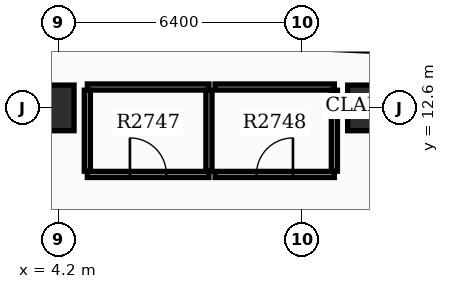
"""IFC4 building model, lengths in metres.
Left out: names, types, materials, properties, quantities, classifications, styles, units other than length and angle.
Written with IfcOpenShell. Run it as: python <this file> out.ifc"""

import sys

from ifc_helpers import new_model, si_unit, direction, frame, frame_2d, origin, origin_2d, place, context, subcontext, project, spatial, rectangle, extrude, element, fill, save


model = new_model("IFC4")
c1 = context("Model", 3, precision=1e-05, world=origin(), true_north=direction((0.0, 1.0)))
c2 = subcontext(c1, "Body", "Model", "MODEL_VIEW")
j1 = project(units=[si_unit("LENGTHUNIT", "METRE"), si_unit("PLANEANGLEUNIT", "RADIAN")], contexts=[c1])
p1 = place(None, origin())
s1 = spatial("IfcSite", under=j1, at=p1, CompositionType="ELEMENT")
p2 = place(p1, origin())
s2 = spatial("IfcBuilding", under=s1, at=p2, CompositionType="ELEMENT")
p3 = place(p2, frame((0.0, 0.0, 172.2)))
s3 = spatial("IfcBuildingStorey", under=s2, at=p3, CompositionType="ELEMENT", Elevation=172.2)
for number, where, z_axis, x_axis in (
    (1, (12.4, 12.6, 0.0), (0.0, 0.0, 1.0), (1.0, 0.0, 0.0)),
    (2, (4.0, 12.6, 0.0), (0.0, 0.0, 1.0), (1.0, 0.0, 0.0)),
):
    element("IfcColumn", number, at=place(p3, frame(where, z_axis=z_axis, x_axis=x_axis)), inside=s3, PredefinedType="COLUMN", context=c2, shape_type="SweptSolid", body=[
        extrude(rectangle(XDim=1.2, YDim=1.2, at=origin_2d()), origin(), (0.0, 0.0, 1.0), 3.9),
    ])
p4 = place(p3, frame((13.843, 14.164, 0.0), z_axis=(0.0, 0.0, 1.0), x_axis=(-0.998889082162, 0.047123258997, 0.0)))
e3 = element("IfcWall", 3, at=p4, inside=s3, PredefinedType="STANDARD", context=c2, shape_type="SweptSolid", body=[
    extrude(rectangle(XDim=6.3, YDim=0.28, at=frame_2d((3.15, 0.0))), origin(), (0.0, 0.0, 1.0), 2.97),
])
p5 = place(p3, frame((4.95, 10.85, 0.0), z_axis=(0.0, 0.0, 1.0), x_axis=(1.0, 0.0, 0.0)))
e4 = element("IfcWall", 4, at=p5, inside=s3, PredefinedType="PARTITIONING", context=c2, shape_type="SweptSolid", body=[
    extrude(rectangle(XDim=3.2, YDim=0.16, at=frame_2d((1.6, 0.0))), origin(), (0.0, 0.0, 1.0), 2.96),
])
p6 = place(p5, frame((1.12, 0.0, 0.0)))
e5 = element("IfcOpeningElement", 5, at=p6, cuts=e4, PredefinedType="OPENING", context=c2, shape_type="SweptSolid", body=[
    extrude(rectangle(XDim=0.96, YDim=2.15, at=frame_2d((0.48, 1.075))), frame((0.0, 0.09, 0.0), z_axis=(0.0, -1.0, 0.0), x_axis=(1.0, 0.0, 0.0)), (0.0, 0.0, 1.0), 0.18),
])
p7 = place(p3, frame((4.95, 13.15, 0.0), z_axis=(0.0, 0.0, 1.0), x_axis=(1.0, 0.0, 0.0)))
e6 = element("IfcWall", 6, at=p7, inside=s3, PredefinedType="PARTITIONING", context=c2, shape_type="SweptSolid", body=[
    extrude(rectangle(XDim=3.2, YDim=0.16, at=frame_2d((1.6, 0.0))), origin(), (0.0, 0.0, 1.0), 2.96),
])
for number, where, z_axis, x_axis in (
    (7, (4.95, 10.935, 0.0), (0.0, 0.0, 1.0), (0.0, 1.0, 0.0)),
    (8, (8.15, 10.935, 0.0), (0.0, 0.0, 1.0), (0.0, 1.0, 0.0)),
):
    element("IfcWall", number, at=place(p3, frame(where, z_axis=z_axis, x_axis=x_axis)), inside=s3, PredefinedType="PARTITIONING", context=c2, shape_type="SweptSolid", body=[
        extrude(rectangle(XDim=2.13, YDim=0.16, at=frame_2d((1.065, 0.0))), origin(), (0.0, 0.0, 1.0), 2.96),
    ])
p8 = place(p3, frame((8.31, 10.85, 0.0), z_axis=(0.0, 0.0, 1.0), x_axis=(1.0, 0.0, 0.0)))
e9 = element("IfcWall", 9, at=p8, inside=s3, PredefinedType="PARTITIONING", context=c2, shape_type="SweptSolid", body=[
    extrude(rectangle(XDim=3.14, YDim=0.16, at=frame_2d((1.57, 0.0))), origin(), (0.0, 0.0, 1.0), 2.96),
])
p9 = place(p8, frame((1.09, 0.0, 0.0)))
e10 = element("IfcOpeningElement", 10, at=p9, cuts=e9, PredefinedType="OPENING", context=c2, shape_type="SweptSolid", body=[
    extrude(rectangle(XDim=0.96, YDim=2.15, at=frame_2d((0.48, 1.075))), frame((0.0, 0.09, 0.0), z_axis=(0.0, -1.0, 0.0), x_axis=(1.0, 0.0, 0.0)), (0.0, 0.0, 1.0), 0.18),
])
p10 = place(p3, frame((8.31, 13.15, 0.0), z_axis=(0.0, 0.0, 1.0), x_axis=(1.0, 0.0, 0.0)))
e11 = element("IfcWall", 11, at=p10, inside=s3, PredefinedType="PARTITIONING", context=c2, shape_type="SweptSolid", body=[
    extrude(rectangle(XDim=3.14, YDim=0.16, at=frame_2d((1.57, 0.0))), origin(), (0.0, 0.0, 1.0), 2.96),
])
p11 = place(p3, frame((11.45, 10.935, 0.0), z_axis=(0.0, 0.0, 1.0), x_axis=(0.0, 1.0, 0.0)))
e12 = element("IfcWall", 12, at=p11, inside=s3, PredefinedType="PARTITIONING", context=c2, shape_type="SweptSolid", body=[
    extrude(rectangle(XDim=2.13, YDim=0.16, at=frame_2d((1.065, 0.0))), origin(), (0.0, 0.0, 1.0), 2.96),
])
p12 = place(p6, origin())
e13 = element("IfcDoor", 13, at=p12, inside=s3, OperationType="SINGLE_SWING_LEFT", PredefinedType="DOOR", context=c2, shape_type="SweptSolid", body=[
    extrude(rectangle(XDim=0.96, YDim=2.15, at=frame_2d((0.48, 1.075))), frame((0.0, 0.025, 0.0), z_axis=(0.0, -1.0, 0.0), x_axis=(1.0, 0.0, 0.0)), (0.0, 0.0, 1.0), 0.05),
])
fill(e5, e13)
p13 = place(p9, origin())
e14 = element("IfcDoor", 14, at=p13, inside=s3, OperationType="SINGLE_SWING_RIGHT", PredefinedType="DOOR", context=c2, shape_type="SweptSolid", body=[
    extrude(rectangle(XDim=0.96, YDim=2.15, at=frame_2d((0.48, 1.075))), frame((0.0, 0.025, 0.0), z_axis=(0.0, -1.0, 0.0), x_axis=(1.0, 0.0, 0.0)), (0.0, 0.0, 1.0), 0.05),
])
fill(e10, e14)
save(model, sys.argv[1])
